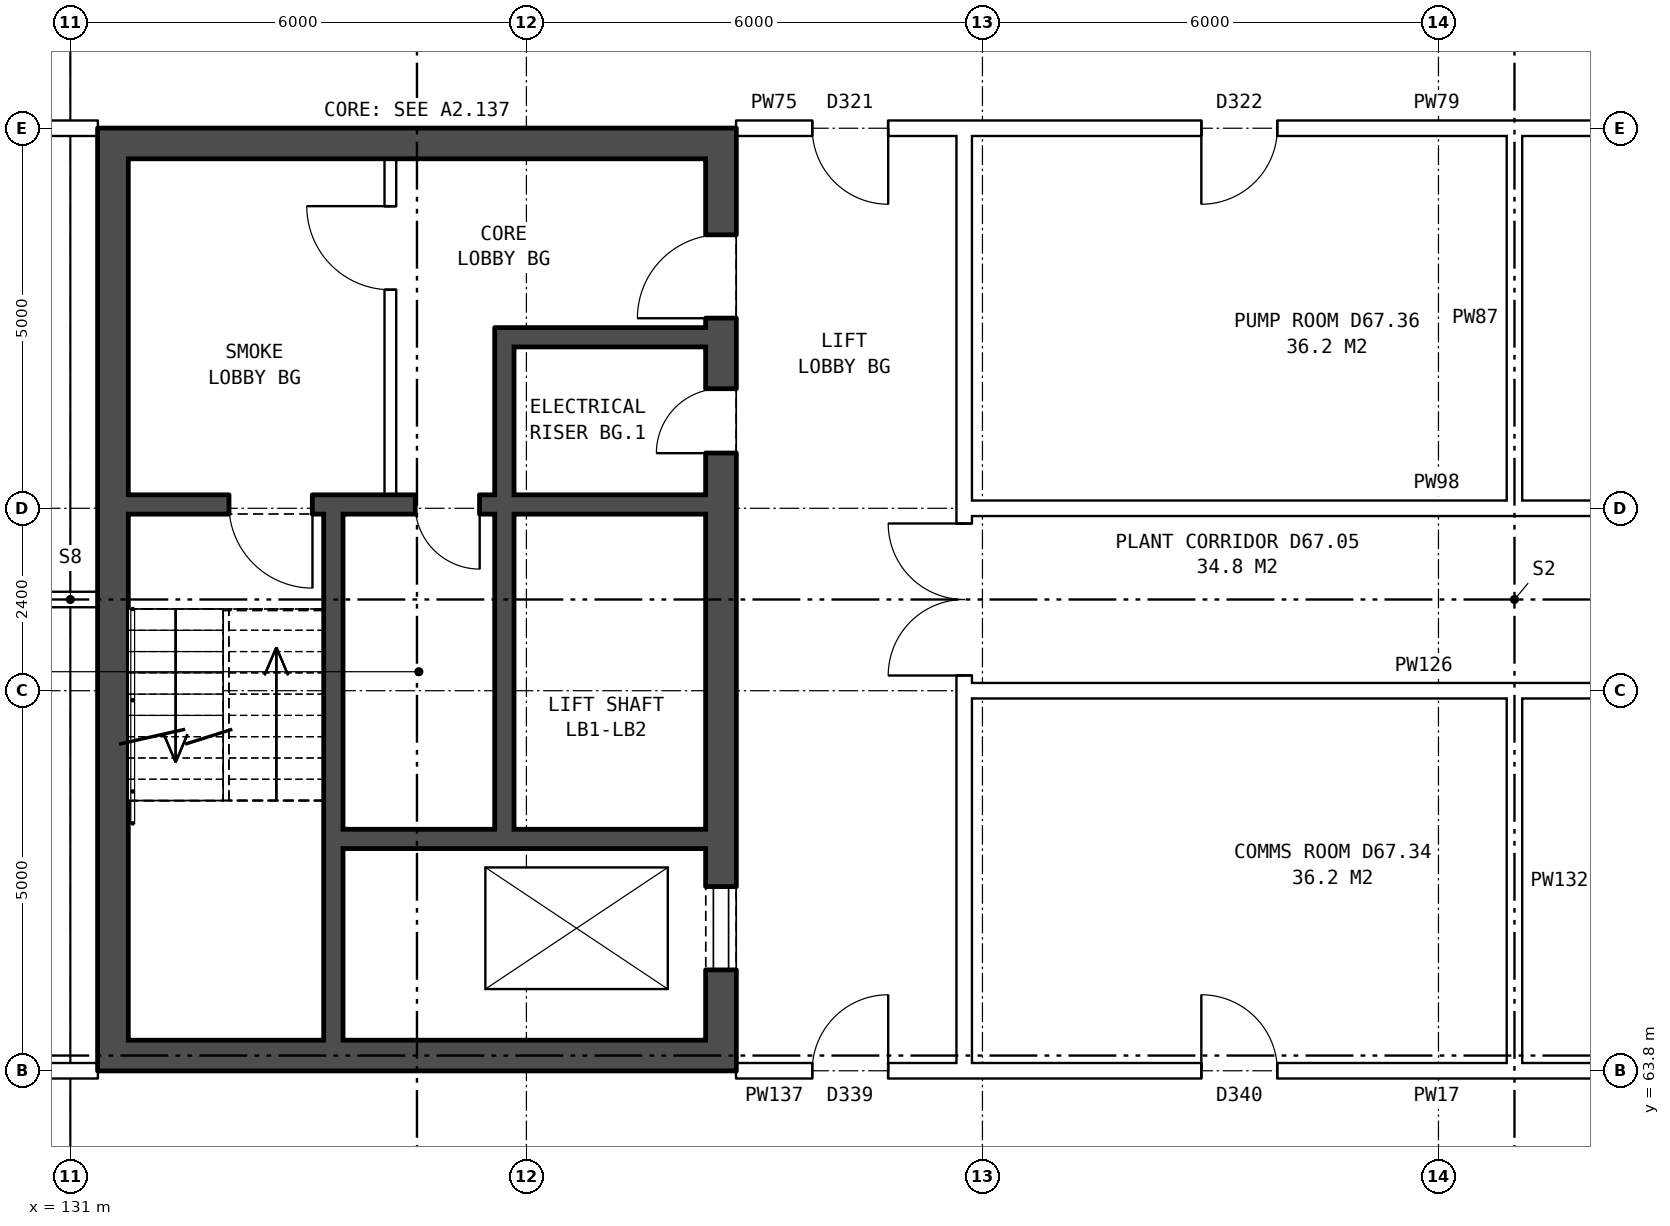
"""IFC4 building model, lengths in metres.
Left out: names, types, materials, properties, quantities, classifications, styles, units other than length and angle.
Written with IfcOpenShell. Run it as: python <this file> out.ifc"""

import sys

from ifc_helpers import new_model, si_unit, direction, frame, frame_2d, origin, place, context, subcontext, project, spatial, rectangle, extrude, element, fill, save


model = new_model("IFC4")
c1 = context("Model", 3, precision=1e-05, world=origin(), true_north=direction((0.0, 1.0)))
c2 = subcontext(c1, "Body", "Model", "MODEL_VIEW")
j1 = project(units=[si_unit("LENGTHUNIT", "METRE"), si_unit("PLANEANGLEUNIT", "RADIAN")], contexts=[c1])
p1 = place(None, origin())
s1 = spatial("IfcSite", under=j1, at=p1, CompositionType="ELEMENT")
p2 = place(p1, origin())
s2 = spatial("IfcBuilding", under=s1, at=p2, CompositionType="ELEMENT")
p3 = place(p2, frame((0.0, 0.0, 236.9)))
s3 = spatial("IfcBuildingStorey", under=s2, at=p3, CompositionType="ELEMENT", Elevation=236.9)
p4 = place(p3, frame((139.56, 63.8, 0.0), z_axis=(0.0, 0.0, 1.0), x_axis=(0.0, 1.0, 0.0)))
e1 = element("IfcWall", 1, at=p4, inside=s3, PredefinedType="SHEAR", context=c2, shape_type="SweptSolid", body=[
    extrude(rectangle(XDim=12.4, YDim=0.4, at=frame_2d((6.2, 0.0))), origin(), (0.0, 0.0, 1.0), 6.7),
])
p5 = place(p4, frame((1.325, 0.0, 0.0)))
e2 = element("IfcOpeningElement", 2, at=p5, cuts=e1, PredefinedType="OPENING", context=c2, shape_type="SweptSolid", body=[
    extrude(rectangle(XDim=1.1, YDim=2.1, at=frame_2d((0.55, 1.05))), frame((0.0, 0.21, 0.0), z_axis=(0.0, -1.0, 0.0), x_axis=(1.0, 0.0, 0.0)), (0.0, 0.0, 1.0), 0.42),
])
p6 = place(p4, frame((9.9, 0.0, 0.0)))
e3 = element("IfcOpeningElement", 3, at=p6, cuts=e1, PredefinedType="OPENING", context=c2, shape_type="SweptSolid", body=[
    extrude(rectangle(XDim=1.1, YDim=2.1, at=frame_2d((0.55, 1.05))), frame((0.0, 0.21, 0.0), z_axis=(0.0, -1.0, 0.0), x_axis=(1.0, 0.0, 0.0)), (0.0, 0.0, 1.0), 0.42),
])
p7 = place(p4, frame((8.125, 0.0, 0.0)))
e4 = element("IfcOpeningElement", 4, at=p7, cuts=e1, PredefinedType="OPENING", context=c2, shape_type="SweptSolid", body=[
    extrude(rectangle(XDim=0.85, YDim=2.1, at=frame_2d((0.425, 1.05))), frame((0.0, 0.21, 0.0), z_axis=(0.0, -1.0, 0.0), x_axis=(1.0, 0.0, 0.0)), (0.0, 0.0, 1.0), 0.42),
])
p8 = place(p3, frame((131.56, 63.8, 0.0), z_axis=(0.0, 0.0, 1.0), x_axis=(0.0, 1.0, 0.0)))
e5 = element("IfcWall", 5, at=p8, inside=s3, PredefinedType="SHEAR", context=c2, shape_type="SweptSolid", body=[
    extrude(rectangle(XDim=12.4, YDim=0.4, at=frame_2d((6.2, 0.0))), origin(), (0.0, 0.0, 1.0), 6.7),
])
for number, where, z_axis, x_axis in (
    (6, (139.36, 64.0, 0.0), (0.0, 0.0, 1.0), (-1.0, 0.0, 0.0)),
    (7, (139.36, 76.0, 0.0), (0.0, 0.0, 1.0), (-1.0, 0.0, 0.0)),
):
    element("IfcWall", number, at=place(p3, frame(where, z_axis=z_axis, x_axis=x_axis)), inside=s3, PredefinedType="SHEAR", context=c2, shape_type="SweptSolid", body=[
        extrude(rectangle(XDim=7.6, YDim=0.4, at=frame_2d((3.8, 0.0))), origin(), (0.0, 0.0, 1.0), 6.7),
    ])
p9 = place(p3, frame((139.36, 66.85, 0.0), z_axis=(0.0, 0.0, 1.0), x_axis=(-1.0, 0.0, 0.0)))
e8 = element("IfcWall", 8, at=p9, inside=s3, PredefinedType="SHEAR", context=c2, shape_type="SweptSolid", body=[
    extrude(rectangle(XDim=4.775, YDim=0.25, at=frame_2d((2.388, 0.0))), origin(), (0.0, 0.0, 1.0), 6.7),
])
p10 = place(p3, frame((139.36, 71.25, 0.0), z_axis=(0.0, 0.0, 1.0), x_axis=(-1.0, 0.0, 0.0)))
e9 = element("IfcWall", 9, at=p10, inside=s3, PredefinedType="SHEAR", context=c2, shape_type="SweptSolid", body=[
    extrude(rectangle(XDim=7.6, YDim=0.25, at=frame_2d((3.8, 0.0))), origin(), (0.0, 0.0, 1.0), 6.7),
])
p11 = place(p10, frame((5.175, 0.0, 0.0)))
e10 = element("IfcOpeningElement", 10, at=p11, cuts=e9, PredefinedType="OPENING", context=c2, shape_type="SweptSolid", body=[
    extrude(rectangle(XDim=1.1, YDim=2.1, at=frame_2d((0.55, 1.05))), frame((0.0, 0.135, 0.0), z_axis=(0.0, -1.0, 0.0), x_axis=(1.0, 0.0, 0.0)), (0.0, 0.0, 1.0), 0.27),
])
p12 = place(p10, frame((2.975, 0.0, 0.0)))
e11 = element("IfcOpeningElement", 11, at=p12, cuts=e9, PredefinedType="OPENING", context=c2, shape_type="SweptSolid", body=[
    extrude(rectangle(XDim=0.85, YDim=2.1, at=frame_2d((0.425, 1.05))), frame((0.0, 0.135, 0.0), z_axis=(0.0, -1.0, 0.0), x_axis=(1.0, 0.0, 0.0)), (0.0, 0.0, 1.0), 0.27),
])
p13 = place(p3, frame((139.36, 73.45, 0.0), z_axis=(0.0, 0.0, 1.0), x_axis=(-1.0, 0.0, 0.0)))
e12 = element("IfcWall", 12, at=p13, inside=s3, PredefinedType="SHEAR", context=c2, shape_type="SweptSolid", body=[
    extrude(rectangle(XDim=2.525, YDim=0.25, at=frame_2d((1.263, 0.0))), origin(), (0.0, 0.0, 1.0), 6.7),
])
p14 = place(p3, frame((136.71, 66.975, 0.0), z_axis=(0.0, 0.0, 1.0), x_axis=(0.0, 1.0, 0.0)))
e13 = element("IfcWall", 13, at=p14, inside=s3, PredefinedType="SHEAR", context=c2, shape_type="SweptSolid", body=[
    extrude(rectangle(XDim=4.15, YDim=0.25, at=frame_2d((2.075, 0.0))), origin(), (0.0, 0.0, 1.0), 6.7),
])
p15 = place(p3, frame((136.71, 71.375, 0.0), z_axis=(0.0, 0.0, 1.0), x_axis=(0.0, 1.0, 0.0)))
e14 = element("IfcWall", 14, at=p15, inside=s3, PredefinedType="SHEAR", context=c2, shape_type="SweptSolid", body=[
    extrude(rectangle(XDim=2.2, YDim=0.25, at=frame_2d((1.1, 0.0))), origin(), (0.0, 0.0, 1.0), 6.7),
])
p16 = place(p3, frame((135.21, 71.375, 0.0), z_axis=(0.0, 0.0, 1.0), x_axis=(0.0, 1.0, 0.0)))
e15 = element("IfcWall", 15, at=p16, inside=s3, PredefinedType="PARTITIONING", context=c2, shape_type="SweptSolid", body=[
    extrude(rectangle(XDim=4.425, YDim=0.15, at=frame_2d((2.212, 0.0))), origin(), (0.0, 0.0, 1.0), 6.7),
])
p17 = place(p16, frame((2.7, 0.0, 0.0)))
e16 = element("IfcOpeningElement", 16, at=p17, cuts=e15, PredefinedType="OPENING", context=c2, shape_type="SweptSolid", body=[
    extrude(rectangle(XDim=1.1, YDim=2.1, at=frame_2d((0.55, 1.05))), frame((0.0, 0.085, 0.0), z_axis=(0.0, -1.0, 0.0), x_axis=(1.0, 0.0, 0.0)), (0.0, 0.0, 1.0), 0.17),
])
p18 = place(p3, frame((134.46, 64.2, 0.0), z_axis=(0.0, 0.0, 1.0), x_axis=(0.0, 1.0, 0.0)))
e17 = element("IfcWall", 17, at=p18, inside=s3, PredefinedType="SHEAR", context=c2, shape_type="SweptSolid", body=[
    extrude(rectangle(XDim=6.925, YDim=0.25, at=frame_2d((3.462, 0.0))), origin(), (0.0, 0.0, 1.0), 6.7),
])
p19 = place(p3, frame((142.76, 63.9, 0.0), z_axis=(0.0, 0.0, 1.0), x_axis=(0.0, 1.0, 0.0)))
e18 = element("IfcWall", 18, at=p19, inside=s3, PredefinedType="PARTITIONING", context=c2, shape_type="SweptSolid", body=[
    extrude(rectangle(XDim=12.2, YDim=0.2, at=frame_2d((6.1, 0.0))), origin(), (0.0, 0.0, 1.0), 6.7),
])
p20 = place(p19, frame((5.1, 0.0, 0.0)))
e19 = element("IfcOpeningElement", 19, at=p20, cuts=e18, PredefinedType="OPENING", context=c2, shape_type="SweptSolid", body=[
    extrude(rectangle(XDim=2.0, YDim=2.1, at=frame_2d((1.0, 1.05))), frame((0.0, 0.11, 0.0), z_axis=(0.0, -1.0, 0.0), x_axis=(1.0, 0.0, 0.0)), (0.0, 0.0, 1.0), 0.22),
])
p21 = place(p3, frame((110.275, 63.8, 0.0), z_axis=(0.0, 0.0, 1.0), x_axis=(1.0, 0.0, 0.0)))
e20 = element("IfcWall", 20, at=p21, inside=s3, PredefinedType="PARTITIONING", context=c2, shape_type="SweptSolid", body=[
    extrude(rectangle(XDim=21.085, YDim=0.2, at=frame_2d((10.542, 0.0))), origin(), (0.0, 0.0, 1.0), 6.7),
])
p22 = place(p21, frame((10.093, 0.0, 0.0)))
e21 = element("IfcOpeningElement", 21, at=p22, cuts=e20, PredefinedType="OPENING", context=c2, shape_type="SweptSolid", body=[
    extrude(rectangle(XDim=1.0, YDim=2.1, at=frame_2d((0.5, 1.05))), frame((0.0, 0.11, 0.0), z_axis=(0.0, -1.0, 0.0), x_axis=(1.0, 0.0, 0.0)), (0.0, 0.0, 1.0), 0.22),
])
p23 = place(p3, frame((142.76, 63.8, 0.0), z_axis=(0.0, 0.0, 1.0), x_axis=(1.0, 0.0, 0.0)))
e22 = element("IfcWall", 22, at=p23, inside=s3, PredefinedType="PARTITIONING", context=c2, shape_type="SweptSolid", body=[
    extrude(rectangle(XDim=14.48, YDim=0.2, at=frame_2d((7.24, 0.0))), origin(), (0.0, 0.0, 1.0), 6.7),
])
p24 = place(p23, frame((3.12, 0.0, 0.0)))
e23 = element("IfcOpeningElement", 23, at=p24, cuts=e22, PredefinedType="OPENING", context=c2, shape_type="SweptSolid", body=[
    extrude(rectangle(XDim=1.0, YDim=2.1, at=frame_2d((0.5, 1.05))), frame((0.0, 0.11, 0.0), z_axis=(0.0, -1.0, 0.0), x_axis=(1.0, 0.0, 0.0)), (0.0, 0.0, 1.0), 0.22),
])
p25 = place(p23, frame((10.36, 0.0, 0.0)))
e24 = element("IfcOpeningElement", 24, at=p25, cuts=e22, PredefinedType="OPENING", context=c2, shape_type="SweptSolid", body=[
    extrude(rectangle(XDim=1.0, YDim=2.1, at=frame_2d((0.5, 1.05))), frame((0.0, 0.11, 0.0), z_axis=(0.0, -1.0, 0.0), x_axis=(1.0, 0.0, 0.0)), (0.0, 0.0, 1.0), 0.22),
])
p26 = place(p3, frame((139.76, 63.8, 0.0), z_axis=(0.0, 0.0, 1.0), x_axis=(1.0, 0.0, 0.0)))
e25 = element("IfcWall", 25, at=p26, inside=s3, PredefinedType="PARTITIONING", context=c2, shape_type="SweptSolid", body=[
    extrude(rectangle(XDim=3.0, YDim=0.2, at=frame_2d((1.5, 0.0))), origin(), (0.0, 0.0, 1.0), 6.7),
])
p27 = place(p26, frame((1.0, 0.0, 0.0)))
e26 = element("IfcOpeningElement", 26, at=p27, cuts=e25, PredefinedType="OPENING", context=c2, shape_type="SweptSolid", body=[
    extrude(rectangle(XDim=1.0, YDim=2.1, at=frame_2d((0.5, 1.05))), frame((0.0, 0.11, 0.0), z_axis=(0.0, -1.0, 0.0), x_axis=(1.0, 0.0, 0.0)), (0.0, 0.0, 1.0), 0.22),
])
p28 = place(p3, frame((142.76, 68.8, 0.0), z_axis=(0.0, 0.0, 1.0), x_axis=(1.0, 0.0, 0.0)))
e27 = element("IfcWall", 27, at=p28, inside=s3, PredefinedType="PARTITIONING", context=c2, shape_type="SweptSolid", body=[
    extrude(rectangle(XDim=14.48, YDim=0.2, at=frame_2d((7.24, 0.0))), origin(), (0.0, 0.0, 1.0), 6.7),
])
p29 = place(p3, frame((110.275, 70.0, 0.0), z_axis=(0.0, 0.0, 1.0), x_axis=(1.0, 0.0, 0.0)))
e28 = element("IfcWall", 28, at=p29, inside=s3, PredefinedType="PARTITIONING", context=c2, shape_type="SweptSolid", body=[
    extrude(rectangle(XDim=21.085, YDim=0.2, at=frame_2d((10.542, 0.0))), origin(), (0.0, 0.0, 1.0), 6.7),
])
p30 = place(p3, frame((142.76, 71.2, 0.0), z_axis=(0.0, 0.0, 1.0), x_axis=(1.0, 0.0, 0.0)))
e29 = element("IfcWall", 29, at=p30, inside=s3, PredefinedType="PARTITIONING", context=c2, shape_type="SweptSolid", body=[
    extrude(rectangle(XDim=14.48, YDim=0.2, at=frame_2d((7.24, 0.0))), origin(), (0.0, 0.0, 1.0), 6.7),
])
p31 = place(p3, frame((110.275, 76.2, 0.0), z_axis=(0.0, 0.0, 1.0), x_axis=(1.0, 0.0, 0.0)))
e30 = element("IfcWall", 30, at=p31, inside=s3, PredefinedType="PARTITIONING", context=c2, shape_type="SweptSolid", body=[
    extrude(rectangle(XDim=21.085, YDim=0.2, at=frame_2d((10.542, 0.0))), origin(), (0.0, 0.0, 1.0), 6.7),
])
p32 = place(p31, frame((10.093, 0.0, 0.0)))
e31 = element("IfcOpeningElement", 31, at=p32, cuts=e30, PredefinedType="OPENING", context=c2, shape_type="SweptSolid", body=[
    extrude(rectangle(XDim=1.0, YDim=2.1, at=frame_2d((0.5, 1.05))), frame((0.0, 0.11, 0.0), z_axis=(0.0, -1.0, 0.0), x_axis=(1.0, 0.0, 0.0)), (0.0, 0.0, 1.0), 0.22),
])
p33 = place(p3, frame((142.76, 76.2, 0.0), z_axis=(0.0, 0.0, 1.0), x_axis=(1.0, 0.0, 0.0)))
e32 = element("IfcWall", 32, at=p33, inside=s3, PredefinedType="PARTITIONING", context=c2, shape_type="SweptSolid", body=[
    extrude(rectangle(XDim=14.48, YDim=0.2, at=frame_2d((7.24, 0.0))), origin(), (0.0, 0.0, 1.0), 6.7),
])
p34 = place(p33, frame((3.12, 0.0, 0.0)))
e33 = element("IfcOpeningElement", 33, at=p34, cuts=e32, PredefinedType="OPENING", context=c2, shape_type="SweptSolid", body=[
    extrude(rectangle(XDim=1.0, YDim=2.1, at=frame_2d((0.5, 1.05))), frame((0.0, 0.11, 0.0), z_axis=(0.0, -1.0, 0.0), x_axis=(1.0, 0.0, 0.0)), (0.0, 0.0, 1.0), 0.22),
])
p35 = place(p33, frame((10.36, 0.0, 0.0)))
e34 = element("IfcOpeningElement", 34, at=p35, cuts=e32, PredefinedType="OPENING", context=c2, shape_type="SweptSolid", body=[
    extrude(rectangle(XDim=1.0, YDim=2.1, at=frame_2d((0.5, 1.05))), frame((0.0, 0.11, 0.0), z_axis=(0.0, -1.0, 0.0), x_axis=(1.0, 0.0, 0.0)), (0.0, 0.0, 1.0), 0.22),
])
p36 = place(p3, frame((139.76, 76.2, 0.0), z_axis=(0.0, 0.0, 1.0), x_axis=(1.0, 0.0, 0.0)))
e35 = element("IfcWall", 35, at=p36, inside=s3, PredefinedType="PARTITIONING", context=c2, shape_type="SweptSolid", body=[
    extrude(rectangle(XDim=3.0, YDim=0.2, at=frame_2d((1.5, 0.0))), origin(), (0.0, 0.0, 1.0), 6.7),
])
p37 = place(p36, frame((1.0, 0.0, 0.0)))
e36 = element("IfcOpeningElement", 36, at=p37, cuts=e35, PredefinedType="OPENING", context=c2, shape_type="SweptSolid", body=[
    extrude(rectangle(XDim=1.0, YDim=2.1, at=frame_2d((0.5, 1.05))), frame((0.0, 0.11, 0.0), z_axis=(0.0, -1.0, 0.0), x_axis=(1.0, 0.0, 0.0)), (0.0, 0.0, 1.0), 0.22),
])
for number, where, z_axis, x_axis in (
    (37, (150.0, 63.7, 0.0), (0.0, 0.0, 1.0), (0.0, 1.0, 0.0)),
    (38, (150.0, 71.1, 0.0), (0.0, 0.0, 1.0), (0.0, 1.0, 0.0)),
):
    element("IfcWall", number, at=place(p3, frame(where, z_axis=z_axis, x_axis=x_axis)), inside=s3, PredefinedType="PARTITIONING", context=c2, shape_type="SweptSolid", body=[
        extrude(rectangle(XDim=5.2, YDim=0.2, at=frame_2d((2.6, 0.0))), origin(), (0.0, 0.0, 1.0), 6.7),
    ])
p38 = place(p5, origin())
e39 = element("IfcDoor", 39, at=p38, inside=s3, OperationType="DOUBLE_DOOR_SLIDING", PredefinedType="DOOR", context=c2, shape_type="SweptSolid", body=[
    extrude(rectangle(XDim=1.1, YDim=2.1, at=frame_2d((0.55, 1.05))), frame((0.0, 0.185, 0.0), z_axis=(0.0, -1.0, 0.0), x_axis=(1.0, 0.0, 0.0)), (0.0, 0.0, 1.0), 0.05),
])
fill(e2, e39)
p39 = place(p6, origin())
e40 = element("IfcDoor", 40, at=p39, inside=s3, OperationType="SINGLE_SWING_LEFT", PredefinedType="DOOR", context=c2, shape_type="SweptSolid", body=[
    extrude(rectangle(XDim=1.1, YDim=2.1, at=frame_2d((0.55, 1.05))), frame((0.0, 0.185, 0.0), z_axis=(0.0, -1.0, 0.0), x_axis=(1.0, 0.0, 0.0)), (0.0, 0.0, 1.0), 0.05),
])
fill(e3, e40)
p40 = place(p17, origin())
e41 = element("IfcDoor", 41, at=p40, inside=s3, OperationType="SINGLE_SWING_RIGHT", PredefinedType="DOOR", context=c2, shape_type="SweptSolid", body=[
    extrude(rectangle(XDim=1.1, YDim=2.1, at=frame_2d((0.55, 1.05))), frame((0.0, 0.025, 0.0), z_axis=(0.0, -1.0, 0.0), x_axis=(1.0, 0.0, 0.0)), (0.0, 0.0, 1.0), 0.05),
])
fill(e16, e41)
p41 = place(p11, origin())
e42 = element("IfcDoor", 42, at=p41, inside=s3, OperationType="SINGLE_SWING_LEFT", PredefinedType="DOOR", context=c2, shape_type="SweptSolid", body=[
    extrude(rectangle(XDim=1.1, YDim=2.1, at=frame_2d((0.55, 1.05))), frame((0.0, 0.025, 0.0), z_axis=(0.0, -1.0, 0.0), x_axis=(1.0, 0.0, 0.0)), (0.0, 0.0, 1.0), 0.05),
])
fill(e10, e42)
p42 = place(p7, origin())
e43 = element("IfcDoor", 43, at=p42, inside=s3, OperationType="SINGLE_SWING_LEFT", PredefinedType="DOOR", context=c2, shape_type="SweptSolid", body=[
    extrude(rectangle(XDim=0.85, YDim=2.1, at=frame_2d((0.425, 1.05))), frame((0.0, 0.185, 0.0), z_axis=(0.0, -1.0, 0.0), x_axis=(1.0, 0.0, 0.0)), (0.0, 0.0, 1.0), 0.05),
])
fill(e4, e43)
p43 = place(p12, origin())
e44 = element("IfcDoor", 44, at=p43, inside=s3, OperationType="SINGLE_SWING_LEFT", PredefinedType="DOOR", context=c2, shape_type="SweptSolid", body=[
    extrude(rectangle(XDim=0.85, YDim=2.1, at=frame_2d((0.425, 1.05))), frame((0.0, 0.025, 0.0), z_axis=(0.0, -1.0, 0.0), x_axis=(1.0, 0.0, 0.0)), (0.0, 0.0, 1.0), 0.05),
])
fill(e11, e44)
p44 = place(p20, origin())
e45 = element("IfcDoor", 45, at=p44, inside=s3, OperationType="DOUBLE_DOOR_SINGLE_SWING", PredefinedType="DOOR", context=c2, shape_type="SweptSolid", body=[
    extrude(rectangle(XDim=2.0, YDim=2.1, at=frame_2d((1.0, 1.05))), frame((0.0, 0.025, 0.0), z_axis=(0.0, -1.0, 0.0), x_axis=(1.0, 0.0, 0.0)), (0.0, 0.0, 1.0), 0.05),
])
fill(e19, e45)
p45 = place(p24, origin())
e46 = element("IfcDoor", 46, at=p45, inside=s3, OperationType="SINGLE_SWING_LEFT", PredefinedType="DOOR", context=c2, shape_type="SweptSolid", body=[
    extrude(rectangle(XDim=1.0, YDim=2.1, at=frame_2d((0.5, 1.05))), frame((0.0, 0.025, 0.0), z_axis=(0.0, -1.0, 0.0), x_axis=(1.0, 0.0, 0.0)), (0.0, 0.0, 1.0), 0.05),
])
fill(e23, e46)
p46 = place(p27, origin())
e47 = element("IfcDoor", 47, at=p46, inside=s3, OperationType="SINGLE_SWING_RIGHT", PredefinedType="DOOR", context=c2, shape_type="SweptSolid", body=[
    extrude(rectangle(XDim=1.0, YDim=2.1, at=frame_2d((0.5, 1.05))), frame((0.0, 0.025, 0.0), z_axis=(0.0, -1.0, 0.0), x_axis=(1.0, 0.0, 0.0)), (0.0, 0.0, 1.0), 0.05),
])
fill(e26, e47)
p47 = place(p34, frame((1.0, 0.0, 0.0), z_axis=(0.0, 0.0, 1.0), x_axis=(-1.0, 0.0, 0.0)))
e48 = element("IfcDoor", 48, at=p47, inside=s3, OperationType="SINGLE_SWING_RIGHT", PredefinedType="DOOR", context=c2, shape_type="SweptSolid", body=[
    extrude(rectangle(XDim=1.0, YDim=2.1, at=frame_2d((0.5, 1.05))), frame((0.0, 0.025, 0.0), z_axis=(0.0, -1.0, 0.0), x_axis=(1.0, 0.0, 0.0)), (0.0, 0.0, 1.0), 0.05),
])
fill(e33, e48)
p48 = place(p37, frame((1.0, 0.0, 0.0), z_axis=(0.0, 0.0, 1.0), x_axis=(-1.0, 0.0, 0.0)))
e49 = element("IfcDoor", 49, at=p48, inside=s3, OperationType="SINGLE_SWING_LEFT", PredefinedType="DOOR", context=c2, shape_type="SweptSolid", body=[
    extrude(rectangle(XDim=1.0, YDim=2.1, at=frame_2d((0.5, 1.05))), frame((0.0, 0.025, 0.0), z_axis=(0.0, -1.0, 0.0), x_axis=(1.0, 0.0, 0.0)), (0.0, 0.0, 1.0), 0.05),
])
fill(e36, e49)
save(model, sys.argv[1])
